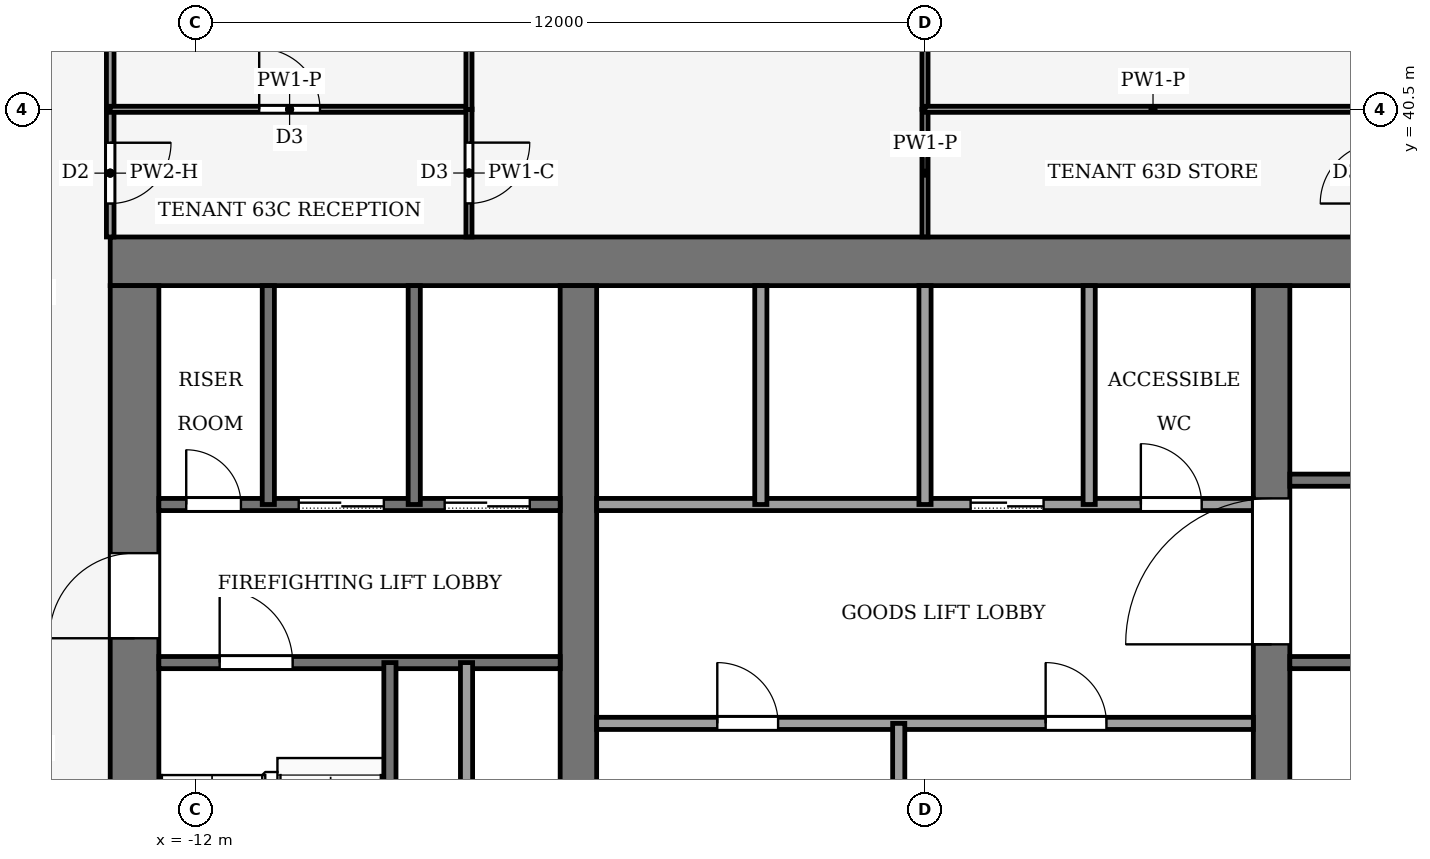
"""IFC4 building model, lengths in metres.
Left out: names, types, materials, properties, quantities, classifications, styles, units other than length and angle.
Written with IfcOpenShell. Run it as: python <this file> out.ifc"""

import sys

from ifc_helpers import new_model, si_unit, direction, frame, frame_2d, origin, place, context, subcontext, project, spatial, rectangle, extrude, element, fill, save


model = new_model("IFC4")
c1 = context("Model", 3, precision=1e-05, world=origin(), true_north=direction((0.0, 1.0)))
c2 = subcontext(c1, "Body", "Model", "MODEL_VIEW")
j1 = project(units=[si_unit("LENGTHUNIT", "METRE"), si_unit("PLANEANGLEUNIT", "RADIAN")], contexts=[c1])
p1 = place(None, origin())
s1 = spatial("IfcSite", under=j1, at=p1, CompositionType="ELEMENT")
p2 = place(p1, origin())
s2 = spatial("IfcBuilding", under=s1, at=p2, CompositionType="ELEMENT")
p3 = place(p2, frame((0.0, 0.0, 274.0)))
s3 = spatial("IfcBuildingStorey", under=s2, at=p3, CompositionType="ELEMENT", Elevation=274.0)
p4 = place(p3, frame((-13.4, 38.0, -0.13), z_axis=(0.0, 0.0, 1.0), x_axis=(1.0, 0.0, 0.0)))
e1 = element("IfcWall", 1, at=p4, inside=s3, PredefinedType="SHEAR", context=c2, shape_type="SweptSolid", body=[
    extrude(rectangle(XDim=26.8, YDim=0.8, at=frame_2d((13.4, 0.0))), origin(), (0.0, 0.0, 1.0), 4.0),
])
p5 = place(p3, frame((-13.0, 18.4, -0.13), z_axis=(0.0, 0.0, 1.0), x_axis=(0.0, 1.0, 0.0)))
e2 = element("IfcWall", 2, at=p5, inside=s3, PredefinedType="SHEAR", context=c2, shape_type="SweptSolid", body=[
    extrude(rectangle(XDim=19.2, YDim=0.8, at=frame_2d((9.6, 0.0))), origin(), (0.0, 0.0, 1.0), 4.0),
])
p6 = place(p5, frame((2.8, 0.0, 0.13)))
e3 = element("IfcOpeningElement", 3, at=p6, cuts=e2, PredefinedType="OPENING", context=c2, shape_type="SweptSolid", body=[
    extrude(rectangle(XDim=2.4, YDim=2.4, at=frame_2d((1.2, 1.2))), frame((0.0, 0.41, 0.0), z_axis=(0.0, -1.0, 0.0), x_axis=(1.0, 0.0, 0.0)), (0.0, 0.0, 1.0), 0.82),
])
p7 = place(p5, frame((13.4, 0.0, 0.13)))
e4 = element("IfcOpeningElement", 4, at=p7, cuts=e2, PredefinedType="OPENING", context=c2, shape_type="SweptSolid", body=[
    extrude(rectangle(XDim=1.4, YDim=2.2, at=frame_2d((0.7, 1.1))), frame((0.0, 0.41, 0.0), z_axis=(0.0, -1.0, 0.0), x_axis=(1.0, 0.0, 0.0)), (0.0, 0.0, 1.0), 0.82),
])
p8 = place(p3, frame((-5.7, 18.4, -0.13), z_axis=(0.0, 0.0, 1.0), x_axis=(0.0, 1.0, 0.0)))
e5 = element("IfcWall", 5, at=p8, inside=s3, PredefinedType="SHEAR", context=c2, shape_type="SweptSolid", body=[
    extrude(rectangle(XDim=19.2, YDim=0.6, at=frame_2d((9.6, 0.0))), origin(), (0.0, 0.0, 1.0), 4.0),
])
p9 = place(p8, frame((8.35, 0.0, 0.13)))
e6 = element("IfcOpeningElement", 6, at=p9, cuts=e5, PredefinedType="OPENING", context=c2, shape_type="SweptSolid", body=[
    extrude(rectangle(XDim=0.9, YDim=2.1, at=frame_2d((0.45, 1.05))), frame((0.0, 0.31, 0.0), z_axis=(0.0, -1.0, 0.0), x_axis=(1.0, 0.0, 0.0)), (0.0, 0.0, 1.0), 0.62),
])
p10 = place(p3, frame((5.7, 18.4, -0.13), z_axis=(0.0, 0.0, 1.0), x_axis=(0.0, 1.0, 0.0)))
e7 = element("IfcWall", 7, at=p10, inside=s3, PredefinedType="SHEAR", context=c2, shape_type="SweptSolid", body=[
    extrude(rectangle(XDim=19.2, YDim=0.6, at=frame_2d((9.6, 0.0))), origin(), (0.0, 0.0, 1.0), 4.0),
])
p11 = place(p10, frame((8.35, 0.0, 0.13)))
e8 = element("IfcOpeningElement", 8, at=p11, cuts=e7, PredefinedType="OPENING", context=c2, shape_type="SweptSolid", body=[
    extrude(rectangle(XDim=0.9, YDim=2.1, at=frame_2d((0.45, 1.05))), frame((0.0, 0.31, 0.0), z_axis=(0.0, -1.0, 0.0), x_axis=(1.0, 0.0, 0.0)), (0.0, 0.0, 1.0), 0.62),
])
p12 = place(p10, frame((13.3, 0.0, 0.13)))
e9 = element("IfcOpeningElement", 9, at=p12, cuts=e7, PredefinedType="OPENING", context=c2, shape_type="SweptSolid", body=[
    extrude(rectangle(XDim=2.4, YDim=2.4, at=frame_2d((1.2, 1.2))), frame((0.0, 0.31, 0.0), z_axis=(0.0, -1.0, 0.0), x_axis=(1.0, 0.0, 0.0)), (0.0, 0.0, 1.0), 0.62),
])
p13 = place(p3, frame((-5.4, 30.4, 0.0), z_axis=(0.0, 0.0, 1.0), x_axis=(1.0, 0.0, 0.0)))
e10 = element("IfcWall", 10, at=p13, inside=s3, PredefinedType="PARTITIONING", context=c2, shape_type="SweptSolid", body=[
    extrude(rectangle(XDim=10.8, YDim=0.2, at=frame_2d((5.4, 0.0))), origin(), (0.0, 0.0, 1.0), 3.87),
])
p14 = place(p13, frame((1.984, 0.0, 0.0)))
e11 = element("IfcOpeningElement", 11, at=p14, cuts=e10, PredefinedType="OPENING", context=c2, shape_type="SweptSolid", body=[
    extrude(rectangle(XDim=1.0, YDim=2.1, at=frame_2d((0.5, 1.05))), frame((0.0, 0.11, 0.0), z_axis=(0.0, -1.0, 0.0), x_axis=(1.0, 0.0, 0.0)), (0.0, 0.0, 1.0), 0.22),
])
p15 = place(p13, frame((7.384, 0.0, 0.0)))
e12 = element("IfcOpeningElement", 12, at=p15, cuts=e10, PredefinedType="OPENING", context=c2, shape_type="SweptSolid", body=[
    extrude(rectangle(XDim=1.0, YDim=2.1, at=frame_2d((0.5, 1.05))), frame((0.0, 0.11, 0.0), z_axis=(0.0, -1.0, 0.0), x_axis=(1.0, 0.0, 0.0)), (0.0, 0.0, 1.0), 0.22),
])
p16 = place(p3, frame((-12.6, 31.4, 0.0), z_axis=(0.0, 0.0, 1.0), x_axis=(1.0, 0.0, 0.0)))
e13 = element("IfcWall", 13, at=p16, inside=s3, PredefinedType="PARTITIONING", context=c2, shape_type="SweptSolid", body=[
    extrude(rectangle(XDim=6.6, YDim=0.2, at=frame_2d((3.3, 0.0))), origin(), (0.0, 0.0, 1.0), 3.87),
])
p17 = place(p16, frame((1.0, 0.0, 0.0)))
e14 = element("IfcOpeningElement", 14, at=p17, cuts=e13, PredefinedType="OPENING", context=c2, shape_type="SweptSolid", body=[
    extrude(rectangle(XDim=1.2, YDim=2.2, at=frame_2d((0.6, 1.1))), frame((0.0, 0.11, 0.0), z_axis=(0.0, -1.0, 0.0), x_axis=(1.0, 0.0, 0.0)), (0.0, 0.0, 1.0), 0.22),
])
p18 = place(p3, frame((6.0, 31.4, 0.0), z_axis=(0.0, 0.0, 1.0), x_axis=(1.0, 0.0, 0.0)))
e15 = element("IfcWall", 15, at=p18, inside=s3, PredefinedType="PARTITIONING", context=c2, shape_type="SweptSolid", body=[
    extrude(rectangle(XDim=6.6, YDim=0.2, at=frame_2d((3.3, 0.0))), origin(), (0.0, 0.0, 1.0), 3.87),
])
p19 = place(p3, frame((-12.6, 34.0, 0.0), z_axis=(0.0, 0.0, 1.0), x_axis=(1.0, 0.0, 0.0)))
e16 = element("IfcWall", 16, at=p19, inside=s3, PredefinedType="PARTITIONING", context=c2, shape_type="SweptSolid", body=[
    extrude(rectangle(XDim=6.6, YDim=0.2, at=frame_2d((3.3, 0.0))), origin(), (0.0, 0.0, 1.0), 3.87),
])
p20 = place(p19, frame((4.7, 0.0, 0.0)))
e17 = element("IfcOpeningElement", 17, at=p20, cuts=e16, PredefinedType="OPENING", context=c2, shape_type="SweptSolid", body=[
    extrude(rectangle(XDim=1.4, YDim=2.2, at=frame_2d((0.7, 1.1))), frame((0.0, 0.11, 0.0), z_axis=(0.0, -1.0, 0.0), x_axis=(1.0, 0.0, 0.0)), (0.0, 0.0, 1.0), 0.22),
])
p21 = place(p19, frame((2.3, 0.0, 0.0)))
e18 = element("IfcOpeningElement", 18, at=p21, cuts=e16, PredefinedType="OPENING", context=c2, shape_type="SweptSolid", body=[
    extrude(rectangle(XDim=1.4, YDim=2.2, at=frame_2d((0.7, 1.1))), frame((0.0, 0.11, 0.0), z_axis=(0.0, -1.0, 0.0), x_axis=(1.0, 0.0, 0.0)), (0.0, 0.0, 1.0), 0.22),
])
p22 = place(p19, frame((0.45, 0.0, 0.0)))
e19 = element("IfcOpeningElement", 19, at=p22, cuts=e16, PredefinedType="OPENING", context=c2, shape_type="SweptSolid", body=[
    extrude(rectangle(XDim=0.9, YDim=2.1, at=frame_2d((0.45, 1.05))), frame((0.0, 0.11, 0.0), z_axis=(0.0, -1.0, 0.0), x_axis=(1.0, 0.0, 0.0)), (0.0, 0.0, 1.0), 0.22),
])
p23 = place(p3, frame((-5.4, 34.0, 0.0), z_axis=(0.0, 0.0, 1.0), x_axis=(1.0, 0.0, 0.0)))
e20 = element("IfcWall", 20, at=p23, inside=s3, PredefinedType="PARTITIONING", context=c2, shape_type="SweptSolid", body=[
    extrude(rectangle(XDim=10.8, YDim=0.2, at=frame_2d((5.4, 0.0))), origin(), (0.0, 0.0, 1.0), 3.87),
])
p24 = place(p23, frame((6.15, 0.0, 0.0)))
e21 = element("IfcOpeningElement", 21, at=p24, cuts=e20, PredefinedType="OPENING", context=c2, shape_type="SweptSolid", body=[
    extrude(rectangle(XDim=1.2, YDim=2.2, at=frame_2d((0.6, 1.1))), frame((0.0, 0.11, 0.0), z_axis=(0.0, -1.0, 0.0), x_axis=(1.0, 0.0, 0.0)), (0.0, 0.0, 1.0), 0.22),
])
p25 = place(p23, frame((8.95, 0.0, 0.0)))
e22 = element("IfcOpeningElement", 22, at=p25, cuts=e20, PredefinedType="OPENING", context=c2, shape_type="SweptSolid", body=[
    extrude(rectangle(XDim=1.0, YDim=2.1, at=frame_2d((0.5, 1.05))), frame((0.0, 0.11, 0.0), z_axis=(0.0, -1.0, 0.0), x_axis=(1.0, 0.0, 0.0)), (0.0, 0.0, 1.0), 0.22),
])
p26 = place(p3, frame((6.0, 34.4, 0.0), z_axis=(0.0, 0.0, 1.0), x_axis=(1.0, 0.0, 0.0)))
e23 = element("IfcWall", 23, at=p26, inside=s3, PredefinedType="PARTITIONING", context=c2, shape_type="SweptSolid", body=[
    extrude(rectangle(XDim=6.6, YDim=0.2, at=frame_2d((3.3, 0.0))), origin(), (0.0, 0.0, 1.0), 3.87),
])
p27 = place(p26, frame((4.8, 0.0, 0.0)))
e24 = element("IfcOpeningElement", 24, at=p27, cuts=e23, PredefinedType="OPENING", context=c2, shape_type="SweptSolid", body=[
    extrude(rectangle(XDim=1.2, YDim=2.2, at=frame_2d((0.6, 1.1))), frame((0.0, 0.11, 0.0), z_axis=(0.0, -1.0, 0.0), x_axis=(1.0, 0.0, 0.0)), (0.0, 0.0, 1.0), 0.22),
])
p28 = place(p3, frame((-10.8, 34.0, 0.0), z_axis=(0.0, 0.0, 1.0), x_axis=(0.0, 1.0, 0.0)))
e25 = element("IfcWall", 25, at=p28, inside=s3, PredefinedType="PARTITIONING", context=c2, shape_type="SweptSolid", body=[
    extrude(rectangle(XDim=3.6, YDim=0.2, at=frame_2d((1.8, 0.0))), origin(), (0.0, 0.0, 1.0), 3.87),
])
p29 = place(p3, frame((-8.8, 24.0, 0.0), z_axis=(0.0, 0.0, 1.0), x_axis=(0.0, 1.0, 0.0)))
e26 = element("IfcWall", 26, at=p29, inside=s3, PredefinedType="PARTITIONING", context=c2, shape_type="SweptSolid", body=[
    extrude(rectangle(XDim=7.4, YDim=0.2, at=frame_2d((3.7, 0.0))), origin(), (0.0, 0.0, 1.0), 3.87),
])
p30 = place(p3, frame((-8.4, 34.0, 0.0), z_axis=(0.0, 0.0, 1.0), x_axis=(0.0, 1.0, 0.0)))
e27 = element("IfcWall", 27, at=p30, inside=s3, PredefinedType="PARTITIONING", context=c2, shape_type="SweptSolid", body=[
    extrude(rectangle(XDim=3.6, YDim=0.2, at=frame_2d((1.8, 0.0))), origin(), (0.0, 0.0, 1.0), 3.87),
])
p31 = place(p3, frame((-7.54, 24.0, 0.0), z_axis=(0.0, 0.0, 1.0), x_axis=(0.0, 1.0, 0.0)))
e28 = element("IfcWall", 28, at=p31, inside=s3, PredefinedType="PARTITIONING", context=c2, shape_type="SweptSolid", body=[
    extrude(rectangle(XDim=7.4, YDim=0.2, at=frame_2d((3.7, 0.0))), origin(), (0.0, 0.0, 1.0), 3.87),
])
p32 = place(p3, frame((-2.7, 34.0, 0.0), z_axis=(0.0, 0.0, 1.0), x_axis=(0.0, 1.0, 0.0)))
e29 = element("IfcWall", 29, at=p32, inside=s3, PredefinedType="PARTITIONING", context=c2, shape_type="SweptSolid", body=[
    extrude(rectangle(XDim=3.6, YDim=0.2, at=frame_2d((1.8, 0.0))), origin(), (0.0, 0.0, 1.0), 3.87),
])
p33 = place(p3, frame((-0.432, 28.0, 0.0), z_axis=(0.0, 0.0, 1.0), x_axis=(0.0, 1.0, 0.0)))
e30 = element("IfcWall", 30, at=p33, inside=s3, PredefinedType="PARTITIONING", context=c2, shape_type="SweptSolid", body=[
    extrude(rectangle(XDim=2.4, YDim=0.2, at=frame_2d((1.2, 0.0))), origin(), (0.0, 0.0, 1.0), 3.87),
])
for number, where, z_axis, x_axis in (
    (31, (0.0, 34.0, 0.0), (0.0, 0.0, 1.0), (0.0, 1.0, 0.0)),
    (32, (2.7, 34.0, 0.0), (0.0, 0.0, 1.0), (0.0, 1.0, 0.0)),
):
    element("IfcWall", number, at=place(p3, frame(where, z_axis=z_axis, x_axis=x_axis)), inside=s3, PredefinedType="PARTITIONING", context=c2, shape_type="SweptSolid", body=[
        extrude(rectangle(XDim=3.6, YDim=0.2, at=frame_2d((1.8, 0.0))), origin(), (0.0, 0.0, 1.0), 3.87),
    ])
p34 = place(p3, frame((-13.4, 40.5, 0.0), z_axis=(0.0, 0.0, 1.0), x_axis=(0.0, -1.0, 0.0)))
e33 = element("IfcWall", 33, at=p34, inside=s3, PredefinedType="PARTITIONING", context=c2, shape_type="SweptSolid", body=[
    extrude(rectangle(XDim=2.1, YDim=0.125, at=frame_2d((1.05, 0.0))), origin(), (0.0, 0.0, 1.0), 3.14),
])
p35 = place(p34, frame((0.55, 0.0, 0.0)))
e34 = element("IfcOpeningElement", 34, at=p35, cuts=e33, PredefinedType="OPENING", context=c2, shape_type="SweptSolid", body=[
    extrude(rectangle(XDim=1.0, YDim=2.1, at=frame_2d((0.5, 1.05))), frame((0.0, 0.073, 0.0), z_axis=(0.0, -1.0, 0.0), x_axis=(1.0, 0.0, 0.0)), (0.0, 0.0, 1.0), 0.145),
])
p36 = place(p3, frame((-13.4, 40.5, 0.0), z_axis=(0.0, 0.0, 1.0), x_axis=(0.0, 1.0, 0.0)))
e35 = element("IfcWall", 35, at=p36, inside=s3, PredefinedType="PARTITIONING", context=c2, shape_type="SweptSolid", body=[
    extrude(rectangle(XDim=3.0, YDim=0.125, at=frame_2d((1.5, 0.0))), origin(), (0.0, 0.0, 1.0), 3.87),
])
p37 = place(p3, frame((-13.4, 40.5, 0.0), z_axis=(0.0, 0.0, 1.0), x_axis=(1.0, 0.0, 0.0)))
e36 = element("IfcWall", 36, at=p37, inside=s3, PredefinedType="PARTITIONING", context=c2, shape_type="SweptSolid", body=[
    extrude(rectangle(XDim=5.9, YDim=0.1, at=frame_2d((2.95, 0.0))), origin(), (0.0, 0.0, 1.0), 3.44),
])
p38 = place(p37, frame((2.45, 0.0, 0.0)))
e37 = element("IfcOpeningElement", 37, at=p38, cuts=e36, PredefinedType="OPENING", context=c2, shape_type="SweptSolid", body=[
    extrude(rectangle(XDim=1.0, YDim=2.1, at=frame_2d((0.5, 1.05))), frame((0.0, 0.06, 0.0), z_axis=(0.0, -1.0, 0.0), x_axis=(1.0, 0.0, 0.0)), (0.0, 0.0, 1.0), 0.12),
])
p39 = place(p3, frame((-7.5, 40.504, 0.0), z_axis=(0.0, 0.0, 1.0), x_axis=(0.0, -1.0, 0.0)))
e38 = element("IfcWall", 38, at=p39, inside=s3, PredefinedType="PARTITIONING", context=c2, shape_type="SweptSolid", body=[
    extrude(rectangle(XDim=2.104, YDim=0.1, at=frame_2d((1.052, 0.0))), origin(), (0.0, 0.0, 1.0), 3.87),
])
p40 = place(p39, frame((0.552, 0.0, 0.0)))
e39 = element("IfcOpeningElement", 39, at=p40, cuts=e38, PredefinedType="OPENING", context=c2, shape_type="SweptSolid", body=[
    extrude(rectangle(XDim=1.0, YDim=2.1, at=frame_2d((0.5, 1.05))), frame((0.0, 0.06, 0.0), z_axis=(0.0, -1.0, 0.0), x_axis=(1.0, 0.0, 0.0)), (0.0, 0.0, 1.0), 0.12),
])
p41 = place(p3, frame((-7.5, 40.496, 0.0), z_axis=(0.0, 0.0, 1.0), x_axis=(0.0, 1.0, 0.0)))
e40 = element("IfcWall", 40, at=p41, inside=s3, PredefinedType="PARTITIONING", context=c2, shape_type="SweptSolid", body=[
    extrude(rectangle(XDim=3.008, YDim=0.1, at=frame_2d((1.504, 0.0))), origin(), (0.0, 0.0, 1.0), 3.87),
])
p42 = place(p3, frame((0.0, 38.4, 0.0), z_axis=(0.0, 0.0, 1.0), x_axis=(0.0, 1.0, 0.0)))
e41 = element("IfcWall", 41, at=p42, inside=s3, PredefinedType="PARTITIONING", context=c2, shape_type="SweptSolid", body=[
    extrude(rectangle(XDim=2.1, YDim=0.1, at=frame_2d((1.05, 0.0))), origin(), (0.0, 0.0, 1.0), 3.44),
])
p43 = place(p3, frame((0.0, 40.5, 0.0), z_axis=(0.0, 0.0, 1.0), x_axis=(0.0, 1.0, 0.0)))
e42 = element("IfcWall", 42, at=p43, inside=s3, PredefinedType="PARTITIONING", context=c2, shape_type="SweptSolid", body=[
    extrude(rectangle(XDim=3.0, YDim=0.1, at=frame_2d((1.5, 0.0))), origin(), (0.0, 0.0, 1.0), 3.44),
])
p44 = place(p3, frame((7.5, 40.5, 0.0), z_axis=(0.0, 0.0, 1.0), x_axis=(-1.0, 0.0, 0.0)))
e43 = element("IfcWall", 43, at=p44, inside=s3, PredefinedType="PARTITIONING", context=c2, shape_type="SweptSolid", body=[
    extrude(rectangle(XDim=7.5, YDim=0.1, at=frame_2d((3.75, 0.0))), origin(), (0.0, 0.0, 1.0), 3.44),
])
p45 = place(p24, origin())
e44 = element("IfcDoor", 44, at=p45, inside=s3, OperationType="SLIDING_TO_LEFT", PredefinedType="DOOR", context=c2, shape_type="SweptSolid", body=[
    extrude(rectangle(XDim=1.2, YDim=2.2, at=frame_2d((0.6, 1.1))), frame((0.0, 0.025, 0.0), z_axis=(0.0, -1.0, 0.0), x_axis=(1.0, 0.0, 0.0)), (0.0, 0.0, 1.0), 0.05),
])
fill(e21, e44)
p46 = place(p20, origin())
e45 = element("IfcDoor", 45, at=p46, inside=s3, OperationType="SLIDING_TO_LEFT", PredefinedType="DOOR", context=c2, shape_type="SweptSolid", body=[
    extrude(rectangle(XDim=1.4, YDim=2.2, at=frame_2d((0.7, 1.1))), frame((0.0, 0.025, 0.0), z_axis=(0.0, -1.0, 0.0), x_axis=(1.0, 0.0, 0.0)), (0.0, 0.0, 1.0), 0.05),
])
fill(e17, e45)
p47 = place(p21, origin())
e46 = element("IfcDoor", 46, at=p47, inside=s3, OperationType="SLIDING_TO_LEFT", PredefinedType="DOOR", context=c2, shape_type="SweptSolid", body=[
    extrude(rectangle(XDim=1.4, YDim=2.2, at=frame_2d((0.7, 1.1))), frame((0.0, 0.025, 0.0), z_axis=(0.0, -1.0, 0.0), x_axis=(1.0, 0.0, 0.0)), (0.0, 0.0, 1.0), 0.05),
])
fill(e18, e46)
p48 = place(p22, origin())
e47 = element("IfcDoor", 47, at=p48, inside=s3, OperationType="SINGLE_SWING_RIGHT", PredefinedType="DOOR", context=c2, shape_type="SweptSolid", body=[
    extrude(rectangle(XDim=0.9, YDim=2.1, at=frame_2d((0.45, 1.05))), frame((0.0, 0.025, 0.0), z_axis=(0.0, -1.0, 0.0), x_axis=(1.0, 0.0, 0.0)), (0.0, 0.0, 1.0), 0.05),
])
fill(e19, e47)
p49 = place(p14, origin())
e48 = element("IfcDoor", 48, at=p49, inside=s3, OperationType="SINGLE_SWING_LEFT", PredefinedType="DOOR", context=c2, shape_type="SweptSolid", body=[
    extrude(rectangle(XDim=1.0, YDim=2.1, at=frame_2d((0.5, 1.05))), frame((0.0, 0.025, 0.0), z_axis=(0.0, -1.0, 0.0), x_axis=(1.0, 0.0, 0.0)), (0.0, 0.0, 1.0), 0.05),
])
fill(e11, e48)
p50 = place(p15, origin())
e49 = element("IfcDoor", 49, at=p50, inside=s3, OperationType="SINGLE_SWING_RIGHT", PredefinedType="DOOR", context=c2, shape_type="SweptSolid", body=[
    extrude(rectangle(XDim=1.0, YDim=2.1, at=frame_2d((0.5, 1.05))), frame((0.0, 0.025, 0.0), z_axis=(0.0, -1.0, 0.0), x_axis=(1.0, 0.0, 0.0)), (0.0, 0.0, 1.0), 0.05),
])
fill(e12, e49)
p51 = place(p25, origin())
e50 = element("IfcDoor", 50, at=p51, inside=s3, OperationType="SINGLE_SWING_LEFT", PredefinedType="DOOR", context=c2, shape_type="SweptSolid", body=[
    extrude(rectangle(XDim=1.0, YDim=2.1, at=frame_2d((0.5, 1.05))), frame((0.0, 0.025, 0.0), z_axis=(0.0, -1.0, 0.0), x_axis=(1.0, 0.0, 0.0)), (0.0, 0.0, 1.0), 0.05),
])
fill(e22, e50)
p52 = place(p17, origin())
e51 = element("IfcDoor", 51, at=p52, inside=s3, OperationType="SINGLE_SWING_LEFT", PredefinedType="DOOR", context=c2, shape_type="SweptSolid", body=[
    extrude(rectangle(XDim=1.2, YDim=2.2, at=frame_2d((0.6, 1.1))), frame((0.0, 0.025, 0.0), z_axis=(0.0, -1.0, 0.0), x_axis=(1.0, 0.0, 0.0)), (0.0, 0.0, 1.0), 0.05),
])
fill(e14, e51)
p53 = place(p12, origin())
e52 = element("IfcDoor", 52, at=p53, inside=s3, OperationType="DOUBLE_DOOR_SINGLE_SWING", PredefinedType="DOOR", context=c2, shape_type="SweptSolid", body=[
    extrude(rectangle(XDim=2.4, YDim=2.4, at=frame_2d((1.2, 1.2))), frame((0.0, 0.025, 0.0), z_axis=(0.0, -1.0, 0.0), x_axis=(1.0, 0.0, 0.0)), (0.0, 0.0, 1.0), 0.05),
])
fill(e9, e52)
p54 = place(p7, origin())
e53 = element("IfcDoor", 53, at=p54, inside=s3, OperationType="SINGLE_SWING_LEFT", PredefinedType="DOOR", context=c2, shape_type="SweptSolid", body=[
    extrude(rectangle(XDim=1.4, YDim=2.2, at=frame_2d((0.7, 1.1))), frame((0.0, 0.025, 0.0), z_axis=(0.0, -1.0, 0.0), x_axis=(1.0, 0.0, 0.0)), (0.0, 0.0, 1.0), 0.05),
])
fill(e4, e53)
p55 = place(p35, origin())
e54 = element("IfcDoor", 54, at=p55, inside=s3, OperationType="SINGLE_SWING_LEFT", PredefinedType="DOOR", context=c2, shape_type="SweptSolid", body=[
    extrude(rectangle(XDim=1.0, YDim=2.1, at=frame_2d((0.5, 1.05))), frame((0.0, 0.025, 0.0), z_axis=(0.0, -1.0, 0.0), x_axis=(1.0, 0.0, 0.0)), (0.0, 0.0, 1.0), 0.05),
])
fill(e34, e54)
p56 = place(p38, origin())
e55 = element("IfcDoor", 55, at=p56, inside=s3, OperationType="SINGLE_SWING_LEFT", PredefinedType="DOOR", context=c2, shape_type="SweptSolid", body=[
    extrude(rectangle(XDim=1.0, YDim=2.1, at=frame_2d((0.5, 1.05))), frame((0.0, 0.025, 0.0), z_axis=(0.0, -1.0, 0.0), x_axis=(1.0, 0.0, 0.0)), (0.0, 0.0, 1.0), 0.05),
])
fill(e37, e55)
p57 = place(p40, origin())
e56 = element("IfcDoor", 56, at=p57, inside=s3, OperationType="SINGLE_SWING_RIGHT", PredefinedType="DOOR", context=c2, shape_type="SweptSolid", body=[
    extrude(rectangle(XDim=1.0, YDim=2.1, at=frame_2d((0.5, 1.05))), frame((0.0, 0.025, 0.0), z_axis=(0.0, -1.0, 0.0), x_axis=(1.0, 0.0, 0.0)), (0.0, 0.0, 1.0), 0.05),
])
fill(e39, e56)
save(model, sys.argv[1])
